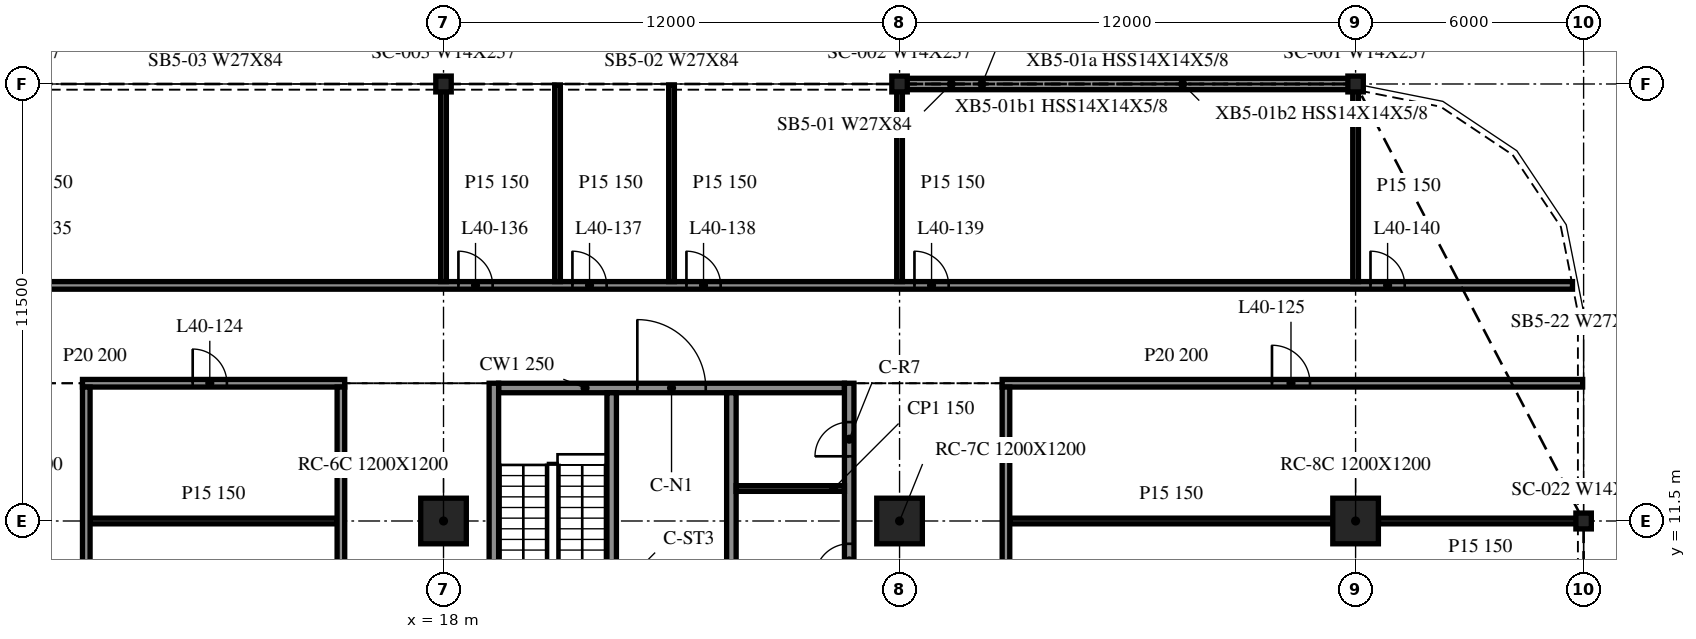
"""IFC4 building model, lengths in metres.
Left out: names, types, materials, properties, quantities, classifications, styles, units other than length and angle.
Written with IfcOpenShell. Run it as: python <this file> out.ifc"""

import sys

from ifc_helpers import new_model, si_unit, direction, frame, frame_2d, origin, origin_2d, place, context, subcontext, project, spatial, rectangle, i_section, extrude, element, fill, save


model = new_model("IFC4")
c1 = context("Model", 3, precision=1e-05, world=origin(), true_north=direction((0.0, 1.0)))
c2 = subcontext(c1, "Body", "Model", "MODEL_VIEW")
j1 = project(units=[si_unit("LENGTHUNIT", "METRE"), si_unit("PLANEANGLEUNIT", "RADIAN")], contexts=[c1])
p1 = place(None, origin())
s1 = spatial("IfcSite", under=j1, at=p1, CompositionType="ELEMENT")
p2 = place(p1, origin())
s2 = spatial("IfcBuilding", under=s1, at=p2, CompositionType="ELEMENT")
p3 = place(p2, frame((0.0, 0.0, 170.6)))
s3 = spatial("IfcBuildingStorey", under=s2, at=p3, CompositionType="ELEMENT", Elevation=170.6)
for number, where, z_axis, x_axis in (
    (1, (18.0, 11.5, -0.34), (0.0, 0.0, 1.0), (1.0, 0.0, 0.0)),
    (2, (30.0, 11.5, -0.34), (0.0, 0.0, 1.0), (1.0, 0.0, 0.0)),
    (3, (42.0, 11.5, -0.34), (0.0, 0.0, 1.0), (1.0, 0.0, 0.0)),
):
    element("IfcColumn", number, at=place(p3, frame(where, z_axis=z_axis, x_axis=x_axis)), inside=s3, PredefinedType="COLUMN", context=c2, shape_type="SweptSolid", body=[
        extrude(rectangle(XDim=1.2, YDim=1.2, at=origin_2d()), origin(), (0.0, 0.0, 1.0), 3.8),
    ])
for number, where, z_axis, x_axis in (
    (4, (42.0, 23.0, -0.34), (0.0, 0.0, 1.0), (1.0, 0.0, 0.0)),
    (5, (30.0, 23.0, -0.34), (0.0, 0.0, 1.0), (1.0, 0.0, 0.0)),
    (6, (18.0, 23.0, -0.34), (0.0, 0.0, 1.0), (1.0, 0.0, 0.0)),
    (7, (48.0, 11.5, -0.34), (0.0, 0.0, 1.0), (1.0, 0.0, 0.0)),
):
    element("IfcColumn", number, at=place(p3, frame(where, z_axis=z_axis, x_axis=x_axis)), inside=s3, PredefinedType="COLUMN", context=c2, shape_type="SweptSolid", body=[
        extrude(i_section(OverallWidth=0.406, OverallDepth=0.417, WebThickness=0.03, FlangeThickness=0.048, at=origin_2d()), origin(), (0.0, 0.0, 1.0), 3.8),
    ])
p4 = place(p3, frame((41.985, 23.0, 0.0), z_axis=(0.0, 0.0, 1.0), x_axis=(-1.0, 0.0, 0.0)))
e8 = element("IfcWall", 8, at=p4, inside=s3, PredefinedType="NOTDEFINED", context=c2, shape_type="SweptSolid", body=[
    extrude(rectangle(XDim=11.97, YDim=0.3, at=frame_2d((5.985, 0.0))), origin(), (0.0, 0.0, 1.0), 2.782),
])
p5 = place(p3, frame((19.325, 15.125, 0.0), z_axis=(0.0, 0.0, 1.0), x_axis=(0.0, -1.0, 0.0)))
e9 = element("IfcWall", 9, at=p5, inside=s3, PredefinedType="SOLIDWALL", context=c2, shape_type="SweptSolid", body=[
    extrude(rectangle(XDim=24.25, YDim=0.25, at=frame_2d((12.125, 0.0))), origin(), (0.0, 0.0, 1.0), 3.46),
])
p6 = place(p3, frame((28.675, -9.125, 0.0), z_axis=(0.0, 0.0, 1.0), x_axis=(0.0, 1.0, 0.0)))
e10 = element("IfcWall", 10, at=p6, inside=s3, PredefinedType="SOLIDWALL", context=c2, shape_type="SweptSolid", body=[
    extrude(rectangle(XDim=24.25, YDim=0.25, at=frame_2d((12.125, 0.0))), origin(), (0.0, 0.0, 1.0), 3.46),
])
p7 = place(p6, frame((13.075, 0.0, 0.0)))
e11 = element("IfcOpeningElement", 11, at=p7, cuts=e10, PredefinedType="OPENING", context=c2, shape_type="SweptSolid", body=[
    extrude(rectangle(XDim=0.9, YDim=2.1, at=frame_2d((0.45, 1.05))), frame((0.0, 0.135, 0.0), z_axis=(0.0, -1.0, 0.0), x_axis=(1.0, 0.0, 0.0)), (0.0, 0.0, 1.0), 0.27),
])
p8 = place(p6, frame((15.775, 0.0, 0.0)))
e12 = element("IfcOpeningElement", 12, at=p8, cuts=e10, PredefinedType="OPENING", context=c2, shape_type="SweptSolid", body=[
    extrude(rectangle(XDim=0.9, YDim=2.1, at=frame_2d((0.45, 1.05))), frame((0.0, 0.135, 0.0), z_axis=(0.0, -1.0, 0.0), x_axis=(1.0, 0.0, 0.0)), (0.0, 0.0, 1.0), 0.27),
])
p9 = place(p6, frame((19.125, 0.0, 0.0)))
e13 = element("IfcOpeningElement", 13, at=p9, cuts=e10, PredefinedType="OPENING", context=c2, shape_type="SweptSolid", body=[
    extrude(rectangle(XDim=0.9, YDim=2.1, at=frame_2d((0.45, 1.05))), frame((0.0, 0.135, 0.0), z_axis=(0.0, -1.0, 0.0), x_axis=(1.0, 0.0, 0.0)), (0.0, 0.0, 1.0), 0.27),
])
p10 = place(p6, frame((22.327, 0.0, 0.0)))
e14 = element("IfcOpeningElement", 14, at=p10, cuts=e10, PredefinedType="OPENING", context=c2, shape_type="SweptSolid", body=[
    extrude(rectangle(XDim=0.9, YDim=2.1, at=frame_2d((0.45, 1.05))), frame((0.0, 0.135, 0.0), z_axis=(0.0, -1.0, 0.0), x_axis=(1.0, 0.0, 0.0)), (0.0, 0.0, 1.0), 0.27),
])
p11 = place(p3, frame((19.45, 15.0, 0.0), z_axis=(0.0, 0.0, 1.0), x_axis=(1.0, 0.0, 0.0)))
e15 = element("IfcWall", 15, at=p11, inside=s3, PredefinedType="SOLIDWALL", context=c2, shape_type="SweptSolid", body=[
    extrude(rectangle(XDim=9.1, YDim=0.25, at=frame_2d((4.55, 0.0))), origin(), (0.0, 0.0, 1.0), 3.46),
])
p12 = place(p11, frame((3.65, 0.0, 0.0)))
e16 = element("IfcOpeningElement", 16, at=p12, cuts=e15, PredefinedType="OPENING", context=c2, shape_type="SweptSolid", body=[
    extrude(rectangle(XDim=1.8, YDim=2.1, at=frame_2d((0.9, 1.05))), frame((0.0, 0.135, 0.0), z_axis=(0.0, -1.0, 0.0), x_axis=(1.0, 0.0, 0.0)), (0.0, 0.0, 1.0), 0.27),
])
p13 = place(p3, frame((22.425, 14.875, 0.0), z_axis=(0.0, 0.0, 1.0), x_axis=(0.0, -1.0, 0.0)))
e17 = element("IfcWall", 17, at=p13, inside=s3, PredefinedType="SOLIDWALL", context=c2, shape_type="SweptSolid", body=[
    extrude(rectangle(XDim=6.25, YDim=0.25, at=frame_2d((3.125, 0.0))), origin(), (0.0, 0.0, 1.0), 3.46),
])
p14 = place(p13, frame((4.85, 0.0, 0.0)))
e18 = element("IfcOpeningElement", 18, at=p14, cuts=e17, PredefinedType="OPENING", context=c2, shape_type="SweptSolid", body=[
    extrude(rectangle(XDim=1.0, YDim=2.1, at=frame_2d((0.5, 1.05))), frame((0.0, 0.135, 0.0), z_axis=(0.0, -1.0, 0.0), x_axis=(1.0, 0.0, 0.0)), (0.0, 0.0, 1.0), 0.27),
])
p15 = place(p3, frame((25.575, 14.875, 0.0), z_axis=(0.0, 0.0, 1.0), x_axis=(0.0, -1.0, 0.0)))
e19 = element("IfcWall", 19, at=p15, inside=s3, PredefinedType="SOLIDWALL", context=c2, shape_type="SweptSolid", body=[
    extrude(rectangle(XDim=17.5, YDim=0.25, at=frame_2d((8.75, 0.0))), origin(), (0.0, 0.0, 1.0), 3.46),
])
p16 = place(p15, frame((15.45, 0.0, 0.0)))
e20 = element("IfcOpeningElement", 20, at=p16, cuts=e19, PredefinedType="OPENING", context=c2, shape_type="SweptSolid", body=[
    extrude(rectangle(XDim=1.1, YDim=2.1, at=frame_2d((0.55, 1.05))), frame((0.0, 0.135, 0.0), z_axis=(0.0, -1.0, 0.0), x_axis=(1.0, 0.0, 0.0)), (0.0, 0.0, 1.0), 0.27),
])
p17 = place(p15, frame((12.8, 0.0, 0.0)))
e21 = element("IfcOpeningElement", 21, at=p17, cuts=e19, PredefinedType="OPENING", context=c2, shape_type="SweptSolid", body=[
    extrude(rectangle(XDim=0.9, YDim=2.1, at=frame_2d((0.45, 1.05))), frame((0.0, 0.135, 0.0), z_axis=(0.0, -1.0, 0.0), x_axis=(1.0, 0.0, 0.0)), (0.0, 0.0, 1.0), 0.27),
])
p18 = place(p3, frame((25.7, 12.355, 0.0), z_axis=(0.0, 0.0, 1.0), x_axis=(1.0, 0.0, 0.0)))
e22 = element("IfcWall", 22, at=p18, inside=s3, PredefinedType="PARTITIONING", context=c2, shape_type="SweptSolid", body=[
    extrude(rectangle(XDim=2.85, YDim=0.15, at=frame_2d((1.425, 0.0))), origin(), (0.0, 0.0, 1.0), 3.46),
])
p19 = place(p3, frame((8.7, 11.5, 0.0), z_axis=(0.0, 0.0, 1.0), x_axis=(1.0, 0.0, 0.0)))
e23 = element("IfcWall", 23, at=p19, inside=s3, PredefinedType="PARTITIONING", context=c2, shape_type="SweptSolid", body=[
    extrude(rectangle(XDim=6.5, YDim=0.15, at=frame_2d((3.25, 0.0))), origin(), (0.0, 0.0, 1.0), 3.46),
])
p20 = place(p3, frame((32.9, 11.5, 0.0), z_axis=(0.0, 0.0, 1.0), x_axis=(1.0, 0.0, 0.0)))
e24 = element("IfcWall", 24, at=p20, inside=s3, PredefinedType="PARTITIONING", context=c2, shape_type="SweptSolid", body=[
    extrude(rectangle(XDim=8.5, YDim=0.15, at=frame_2d((4.25, 0.0))), origin(), (0.0, 0.0, 1.0), 3.46),
])
p21 = place(p3, frame((42.6, 11.5, 0.0), z_axis=(0.0, 0.0, 1.0), x_axis=(1.0, 0.0, 0.0)))
e25 = element("IfcWall", 25, at=p21, inside=s3, PredefinedType="PARTITIONING", context=c2, shape_type="SweptSolid", body=[
    extrude(rectangle(XDim=5.375, YDim=0.15, at=frame_2d((2.688, 0.0))), origin(), (0.0, 0.0, 1.0), 3.46),
])
p22 = place(p3, frame((8.5, 15.125, 0.0), z_axis=(0.0, 0.0, 1.0), x_axis=(1.0, 0.0, 0.0)))
e26 = element("IfcWall", 26, at=p22, inside=s3, PredefinedType="PARTITIONING", context=c2, shape_type="SweptSolid", body=[
    extrude(rectangle(XDim=6.9, YDim=0.2, at=frame_2d((3.45, 0.0))), origin(), (0.0, 0.0, 1.0), 3.46),
])
p23 = place(p22, frame((2.9, 0.0, 0.0)))
e27 = element("IfcOpeningElement", 27, at=p23, cuts=e26, PredefinedType="OPENING", context=c2, shape_type="SweptSolid", body=[
    extrude(rectangle(XDim=0.9, YDim=2.1, at=frame_2d((0.45, 1.05))), frame((0.0, 0.11, 0.0), z_axis=(0.0, -1.0, 0.0), x_axis=(1.0, 0.0, 0.0)), (0.0, 0.0, 1.0), 0.22),
])
p24 = place(p3, frame((32.7, 15.125, 0.0), z_axis=(0.0, 0.0, 1.0), x_axis=(1.0, 0.0, 0.0)))
e28 = element("IfcWall", 28, at=p24, inside=s3, PredefinedType="PARTITIONING", context=c2, shape_type="SweptSolid", body=[
    extrude(rectangle(XDim=15.275, YDim=0.2, at=frame_2d((7.638, 0.0))), origin(), (0.0, 0.0, 1.0), 3.46),
])
p25 = place(p24, frame((7.1, 0.0, 0.0)))
e29 = element("IfcOpeningElement", 29, at=p25, cuts=e28, PredefinedType="OPENING", context=c2, shape_type="SweptSolid", body=[
    extrude(rectangle(XDim=1.0, YDim=2.1, at=frame_2d((0.5, 1.05))), frame((0.0, 0.11, 0.0), z_axis=(0.0, -1.0, 0.0), x_axis=(1.0, 0.0, 0.0)), (0.0, 0.0, 1.0), 0.22),
])
p26 = place(p3, frame((-47.708, 17.7, 0.0), z_axis=(0.0, 0.0, 1.0), x_axis=(1.0, 0.0, 0.0)))
e30 = element("IfcWall", 30, at=p26, inside=s3, PredefinedType="PARTITIONING", context=c2, shape_type="SweptSolid", body=[
    extrude(rectangle(XDim=95.416, YDim=0.2, at=frame_2d((47.708, 0.0))), origin(), (0.0, 0.0, 1.0), 3.46),
])
p27 = place(p26, frame((4.5, 0.0, 0.0)))
e31 = element("IfcOpeningElement", 31, at=p27, cuts=e30, PredefinedType="OPENING", context=c2, shape_type="SweptSolid", body=[
    extrude(rectangle(XDim=0.9, YDim=2.1, at=frame_2d((0.45, 1.05))), frame((0.0, 0.11, 0.0), z_axis=(0.0, -1.0, 0.0), x_axis=(1.0, 0.0, 0.0)), (0.0, 0.0, 1.0), 0.22),
])
p28 = place(p26, frame((16.5, 0.0, 0.0)))
e32 = element("IfcOpeningElement", 32, at=p28, cuts=e30, PredefinedType="OPENING", context=c2, shape_type="SweptSolid", body=[
    extrude(rectangle(XDim=0.9, YDim=2.1, at=frame_2d((0.45, 1.05))), frame((0.0, 0.11, 0.0), z_axis=(0.0, -1.0, 0.0), x_axis=(1.0, 0.0, 0.0)), (0.0, 0.0, 1.0), 0.22),
])
p29 = place(p26, frame((19.5, 0.0, 0.0)))
e33 = element("IfcOpeningElement", 33, at=p29, cuts=e30, PredefinedType="OPENING", context=c2, shape_type="SweptSolid", body=[
    extrude(rectangle(XDim=0.9, YDim=2.1, at=frame_2d((0.45, 1.05))), frame((0.0, 0.11, 0.0), z_axis=(0.0, -1.0, 0.0), x_axis=(1.0, 0.0, 0.0)), (0.0, 0.0, 1.0), 0.22),
])
p30 = place(p26, frame((22.5, 0.0, 0.0)))
e34 = element("IfcOpeningElement", 34, at=p30, cuts=e30, PredefinedType="OPENING", context=c2, shape_type="SweptSolid", body=[
    extrude(rectangle(XDim=0.9, YDim=2.1, at=frame_2d((0.45, 1.05))), frame((0.0, 0.11, 0.0), z_axis=(0.0, -1.0, 0.0), x_axis=(1.0, 0.0, 0.0)), (0.0, 0.0, 1.0), 0.22),
])
p31 = place(p26, frame((28.5, 0.0, 0.0)))
e35 = element("IfcOpeningElement", 35, at=p31, cuts=e30, PredefinedType="OPENING", context=c2, shape_type="SweptSolid", body=[
    extrude(rectangle(XDim=0.9, YDim=2.1, at=frame_2d((0.45, 1.05))), frame((0.0, 0.11, 0.0), z_axis=(0.0, -1.0, 0.0), x_axis=(1.0, 0.0, 0.0)), (0.0, 0.0, 1.0), 0.22),
])
p32 = place(p26, frame((40.5, 0.0, 0.0)))
e36 = element("IfcOpeningElement", 36, at=p32, cuts=e30, PredefinedType="OPENING", context=c2, shape_type="SweptSolid", body=[
    extrude(rectangle(XDim=0.9, YDim=2.1, at=frame_2d((0.45, 1.05))), frame((0.0, 0.11, 0.0), z_axis=(0.0, -1.0, 0.0), x_axis=(1.0, 0.0, 0.0)), (0.0, 0.0, 1.0), 0.22),
])
p33 = place(p26, frame((43.5, 0.0, 0.0)))
e37 = element("IfcOpeningElement", 37, at=p33, cuts=e30, PredefinedType="OPENING", context=c2, shape_type="SweptSolid", body=[
    extrude(rectangle(XDim=0.9, YDim=2.1, at=frame_2d((0.45, 1.05))), frame((0.0, 0.11, 0.0), z_axis=(0.0, -1.0, 0.0), x_axis=(1.0, 0.0, 0.0)), (0.0, 0.0, 1.0), 0.22),
])
p34 = place(p26, frame((46.5, 0.0, 0.0)))
e38 = element("IfcOpeningElement", 38, at=p34, cuts=e30, PredefinedType="OPENING", context=c2, shape_type="SweptSolid", body=[
    extrude(rectangle(XDim=0.9, YDim=2.1, at=frame_2d((0.45, 1.05))), frame((0.0, 0.11, 0.0), z_axis=(0.0, -1.0, 0.0), x_axis=(1.0, 0.0, 0.0)), (0.0, 0.0, 1.0), 0.22),
])
p35 = place(p26, frame((48.1, 0.0, 0.0)))
e39 = element("IfcOpeningElement", 39, at=p35, cuts=e30, PredefinedType="OPENING", context=c2, shape_type="SweptSolid", body=[
    extrude(rectangle(XDim=0.9, YDim=2.1, at=frame_2d((0.45, 1.05))), frame((0.0, 0.11, 0.0), z_axis=(0.0, -1.0, 0.0), x_axis=(1.0, 0.0, 0.0)), (0.0, 0.0, 1.0), 0.22),
])
p36 = place(p26, frame((54.1, 0.0, 0.0)))
e40 = element("IfcOpeningElement", 40, at=p36, cuts=e30, PredefinedType="OPENING", context=c2, shape_type="SweptSolid", body=[
    extrude(rectangle(XDim=0.9, YDim=2.1, at=frame_2d((0.45, 1.05))), frame((0.0, 0.11, 0.0), z_axis=(0.0, -1.0, 0.0), x_axis=(1.0, 0.0, 0.0)), (0.0, 0.0, 1.0), 0.22),
])
p37 = place(p26, frame((66.1, 0.0, 0.0)))
e41 = element("IfcOpeningElement", 41, at=p37, cuts=e30, PredefinedType="OPENING", context=c2, shape_type="SweptSolid", body=[
    extrude(rectangle(XDim=0.9, YDim=2.1, at=frame_2d((0.45, 1.05))), frame((0.0, 0.11, 0.0), z_axis=(0.0, -1.0, 0.0), x_axis=(1.0, 0.0, 0.0)), (0.0, 0.0, 1.0), 0.22),
])
p38 = place(p26, frame((69.1, 0.0, 0.0)))
e42 = element("IfcOpeningElement", 42, at=p38, cuts=e30, PredefinedType="OPENING", context=c2, shape_type="SweptSolid", body=[
    extrude(rectangle(XDim=0.9, YDim=2.1, at=frame_2d((0.45, 1.05))), frame((0.0, 0.11, 0.0), z_axis=(0.0, -1.0, 0.0), x_axis=(1.0, 0.0, 0.0)), (0.0, 0.0, 1.0), 0.22),
])
p39 = place(p26, frame((72.1, 0.0, 0.0)))
e43 = element("IfcOpeningElement", 43, at=p39, cuts=e30, PredefinedType="OPENING", context=c2, shape_type="SweptSolid", body=[
    extrude(rectangle(XDim=0.9, YDim=2.1, at=frame_2d((0.45, 1.05))), frame((0.0, 0.11, 0.0), z_axis=(0.0, -1.0, 0.0), x_axis=(1.0, 0.0, 0.0)), (0.0, 0.0, 1.0), 0.22),
])
p40 = place(p26, frame((78.1, 0.0, 0.0)))
e44 = element("IfcOpeningElement", 44, at=p40, cuts=e30, PredefinedType="OPENING", context=c2, shape_type="SweptSolid", body=[
    extrude(rectangle(XDim=0.9, YDim=2.1, at=frame_2d((0.45, 1.05))), frame((0.0, 0.11, 0.0), z_axis=(0.0, -1.0, 0.0), x_axis=(1.0, 0.0, 0.0)), (0.0, 0.0, 1.0), 0.22),
])
p41 = place(p26, frame((90.1, 0.0, 0.0)))
e45 = element("IfcOpeningElement", 45, at=p41, cuts=e30, PredefinedType="OPENING", context=c2, shape_type="SweptSolid", body=[
    extrude(rectangle(XDim=0.9, YDim=2.1, at=frame_2d((0.45, 1.05))), frame((0.0, 0.11, 0.0), z_axis=(0.0, -1.0, 0.0), x_axis=(1.0, 0.0, 0.0)), (0.0, 0.0, 1.0), 0.22),
])
p42 = place(p3, frame((8.6, -9.025, 0.0), z_axis=(0.0, 0.0, 1.0), x_axis=(0.0, 1.0, 0.0)))
e46 = element("IfcWall", 46, at=p42, inside=s3, PredefinedType="PARTITIONING", context=c2, shape_type="SweptSolid", body=[
    extrude(rectangle(XDim=24.05, YDim=0.2, at=frame_2d((12.025, 0.0))), origin(), (0.0, 0.0, 1.0), 3.46),
])
p43 = place(p42, frame((12.3, 0.0, 0.0)))
e47 = element("IfcOpeningElement", 47, at=p43, cuts=e46, PredefinedType="OPENING", context=c2, shape_type="SweptSolid", body=[
    extrude(rectangle(XDim=0.9, YDim=2.1, at=frame_2d((0.45, 1.05))), frame((0.0, 0.11, 0.0), z_axis=(0.0, -1.0, 0.0), x_axis=(1.0, 0.0, 0.0)), (0.0, 0.0, 1.0), 0.22),
])
p44 = place(p3, frame((15.3, -9.025, 0.0), z_axis=(0.0, 0.0, 1.0), x_axis=(0.0, 1.0, 0.0)))
e48 = element("IfcWall", 48, at=p44, inside=s3, PredefinedType="PARTITIONING", context=c2, shape_type="SweptSolid", body=[
    extrude(rectangle(XDim=24.05, YDim=0.2, at=frame_2d((12.025, 0.0))), origin(), (0.0, 0.0, 1.0), 3.46),
])
for number, where, z_axis, x_axis in (
    (49, (18.0, 17.8, 0.0), (0.0, 0.0, 1.0), (0.0, 1.0, 0.0)),
    (50, (21.0, 17.8, 0.0), (0.0, 0.0, 1.0), (0.0, 1.0, 0.0)),
    (51, (24.0, 17.8, 0.0), (0.0, 0.0, 1.0), (0.0, 1.0, 0.0)),
    (52, (30.0, 17.8, 0.0), (0.0, 0.0, 1.0), (0.0, 1.0, 0.0)),
):
    element("IfcWall", number, at=place(p3, frame(where, z_axis=z_axis, x_axis=x_axis)), inside=s3, PredefinedType="PARTITIONING", context=c2, shape_type="SweptSolid", body=[
        extrude(rectangle(XDim=5.175, YDim=0.15, at=frame_2d((2.587, 0.0))), origin(), (0.0, 0.0, 1.0), 3.46),
    ])
p45 = place(p3, frame((32.8, -9.025, 0.0), z_axis=(0.0, 0.0, 1.0), x_axis=(0.0, 1.0, 0.0)))
e53 = element("IfcWall", 53, at=p45, inside=s3, PredefinedType="PARTITIONING", context=c2, shape_type="SweptSolid", body=[
    extrude(rectangle(XDim=24.05, YDim=0.2, at=frame_2d((12.025, 0.0))), origin(), (0.0, 0.0, 1.0), 3.46),
])
p46 = place(p45, frame((12.3, 0.0, 0.0)))
e54 = element("IfcOpeningElement", 54, at=p46, cuts=e53, PredefinedType="OPENING", context=c2, shape_type="SweptSolid", body=[
    extrude(rectangle(XDim=1.0, YDim=2.1, at=frame_2d((0.5, 1.05))), frame((0.0, 0.11, 0.0), z_axis=(0.0, -1.0, 0.0), x_axis=(1.0, 0.0, 0.0)), (0.0, 0.0, 1.0), 0.22),
])
p47 = place(p3, frame((42.0, 17.8, 0.0), z_axis=(0.0, 0.0, 1.0), x_axis=(0.0, 1.0, 0.0)))
e55 = element("IfcWall", 55, at=p47, inside=s3, PredefinedType="PARTITIONING", context=c2, shape_type="SweptSolid", body=[
    extrude(rectangle(XDim=5.047, YDim=0.15, at=frame_2d((2.523, 0.0))), origin(), (0.0, 0.0, 1.0), 3.46),
])
p48 = place(p12, origin())
e56 = element("IfcDoor", 56, at=p48, inside=s3, OperationType="DOUBLE_DOOR_SINGLE_SWING", PredefinedType="DOOR", context=c2, shape_type="SweptSolid", body=[
    extrude(rectangle(XDim=1.8, YDim=2.1, at=frame_2d((0.9, 1.05))), frame((0.0, 0.025, 0.0), z_axis=(0.0, -1.0, 0.0), x_axis=(1.0, 0.0, 0.0)), (0.0, 0.0, 1.0), 0.05),
])
fill(e16, e56)
p49 = place(p9, origin())
e57 = element("IfcDoor", 57, at=p49, inside=s3, OperationType="SINGLE_SWING_RIGHT", PredefinedType="DOOR", context=c2, shape_type="SweptSolid", body=[
    extrude(rectangle(XDim=0.9, YDim=2.1, at=frame_2d((0.45, 1.05))), frame((0.0, 0.025, 0.0), z_axis=(0.0, -1.0, 0.0), x_axis=(1.0, 0.0, 0.0)), (0.0, 0.0, 1.0), 0.05),
])
fill(e13, e57)
p50 = place(p10, origin())
e58 = element("IfcDoor", 58, at=p50, inside=s3, OperationType="SINGLE_SWING_LEFT", PredefinedType="DOOR", context=c2, shape_type="SweptSolid", body=[
    extrude(rectangle(XDim=0.9, YDim=2.1, at=frame_2d((0.45, 1.05))), frame((0.0, 0.025, 0.0), z_axis=(0.0, -1.0, 0.0), x_axis=(1.0, 0.0, 0.0)), (0.0, 0.0, 1.0), 0.05),
])
fill(e14, e58)
p51 = place(p23, origin())
e59 = element("IfcDoor", 59, at=p51, inside=s3, OperationType="SINGLE_SWING_RIGHT", PredefinedType="DOOR", context=c2, shape_type="SweptSolid", body=[
    extrude(rectangle(XDim=0.9, YDim=2.1, at=frame_2d((0.45, 1.05))), frame((0.0, 0.025, 0.0), z_axis=(0.0, -1.0, 0.0), x_axis=(1.0, 0.0, 0.0)), (0.0, 0.0, 1.0), 0.05),
])
fill(e27, e59)
p52 = place(p25, origin())
e60 = element("IfcDoor", 60, at=p52, inside=s3, OperationType="SINGLE_SWING_LEFT", PredefinedType="DOOR", context=c2, shape_type="SweptSolid", body=[
    extrude(rectangle(XDim=1.0, YDim=2.1, at=frame_2d((0.5, 1.05))), frame((0.0, 0.025, 0.0), z_axis=(0.0, -1.0, 0.0), x_axis=(1.0, 0.0, 0.0)), (0.0, 0.0, 1.0), 0.05),
])
fill(e29, e60)
p53 = place(p37, origin())
e61 = element("IfcDoor", 61, at=p53, inside=s3, OperationType="SINGLE_SWING_RIGHT", PredefinedType="DOOR", context=c2, shape_type="SweptSolid", body=[
    extrude(rectangle(XDim=0.9, YDim=2.1, at=frame_2d((0.45, 1.05))), frame((0.0, 0.025, 0.0), z_axis=(0.0, -1.0, 0.0), x_axis=(1.0, 0.0, 0.0)), (0.0, 0.0, 1.0), 0.05),
])
fill(e41, e61)
p54 = place(p38, origin())
e62 = element("IfcDoor", 62, at=p54, inside=s3, OperationType="SINGLE_SWING_RIGHT", PredefinedType="DOOR", context=c2, shape_type="SweptSolid", body=[
    extrude(rectangle(XDim=0.9, YDim=2.1, at=frame_2d((0.45, 1.05))), frame((0.0, 0.025, 0.0), z_axis=(0.0, -1.0, 0.0), x_axis=(1.0, 0.0, 0.0)), (0.0, 0.0, 1.0), 0.05),
])
fill(e42, e62)
p55 = place(p39, origin())
e63 = element("IfcDoor", 63, at=p55, inside=s3, OperationType="SINGLE_SWING_RIGHT", PredefinedType="DOOR", context=c2, shape_type="SweptSolid", body=[
    extrude(rectangle(XDim=0.9, YDim=2.1, at=frame_2d((0.45, 1.05))), frame((0.0, 0.025, 0.0), z_axis=(0.0, -1.0, 0.0), x_axis=(1.0, 0.0, 0.0)), (0.0, 0.0, 1.0), 0.05),
])
fill(e43, e63)
p56 = place(p40, origin())
e64 = element("IfcDoor", 64, at=p56, inside=s3, OperationType="SINGLE_SWING_RIGHT", PredefinedType="DOOR", context=c2, shape_type="SweptSolid", body=[
    extrude(rectangle(XDim=0.9, YDim=2.1, at=frame_2d((0.45, 1.05))), frame((0.0, 0.025, 0.0), z_axis=(0.0, -1.0, 0.0), x_axis=(1.0, 0.0, 0.0)), (0.0, 0.0, 1.0), 0.05),
])
fill(e44, e64)
p57 = place(p41, origin())
e65 = element("IfcDoor", 65, at=p57, inside=s3, OperationType="SINGLE_SWING_RIGHT", PredefinedType="DOOR", context=c2, shape_type="SweptSolid", body=[
    extrude(rectangle(XDim=0.9, YDim=2.1, at=frame_2d((0.45, 1.05))), frame((0.0, 0.025, 0.0), z_axis=(0.0, -1.0, 0.0), x_axis=(1.0, 0.0, 0.0)), (0.0, 0.0, 1.0), 0.05),
])
fill(e45, e65)
save(model, sys.argv[1])
